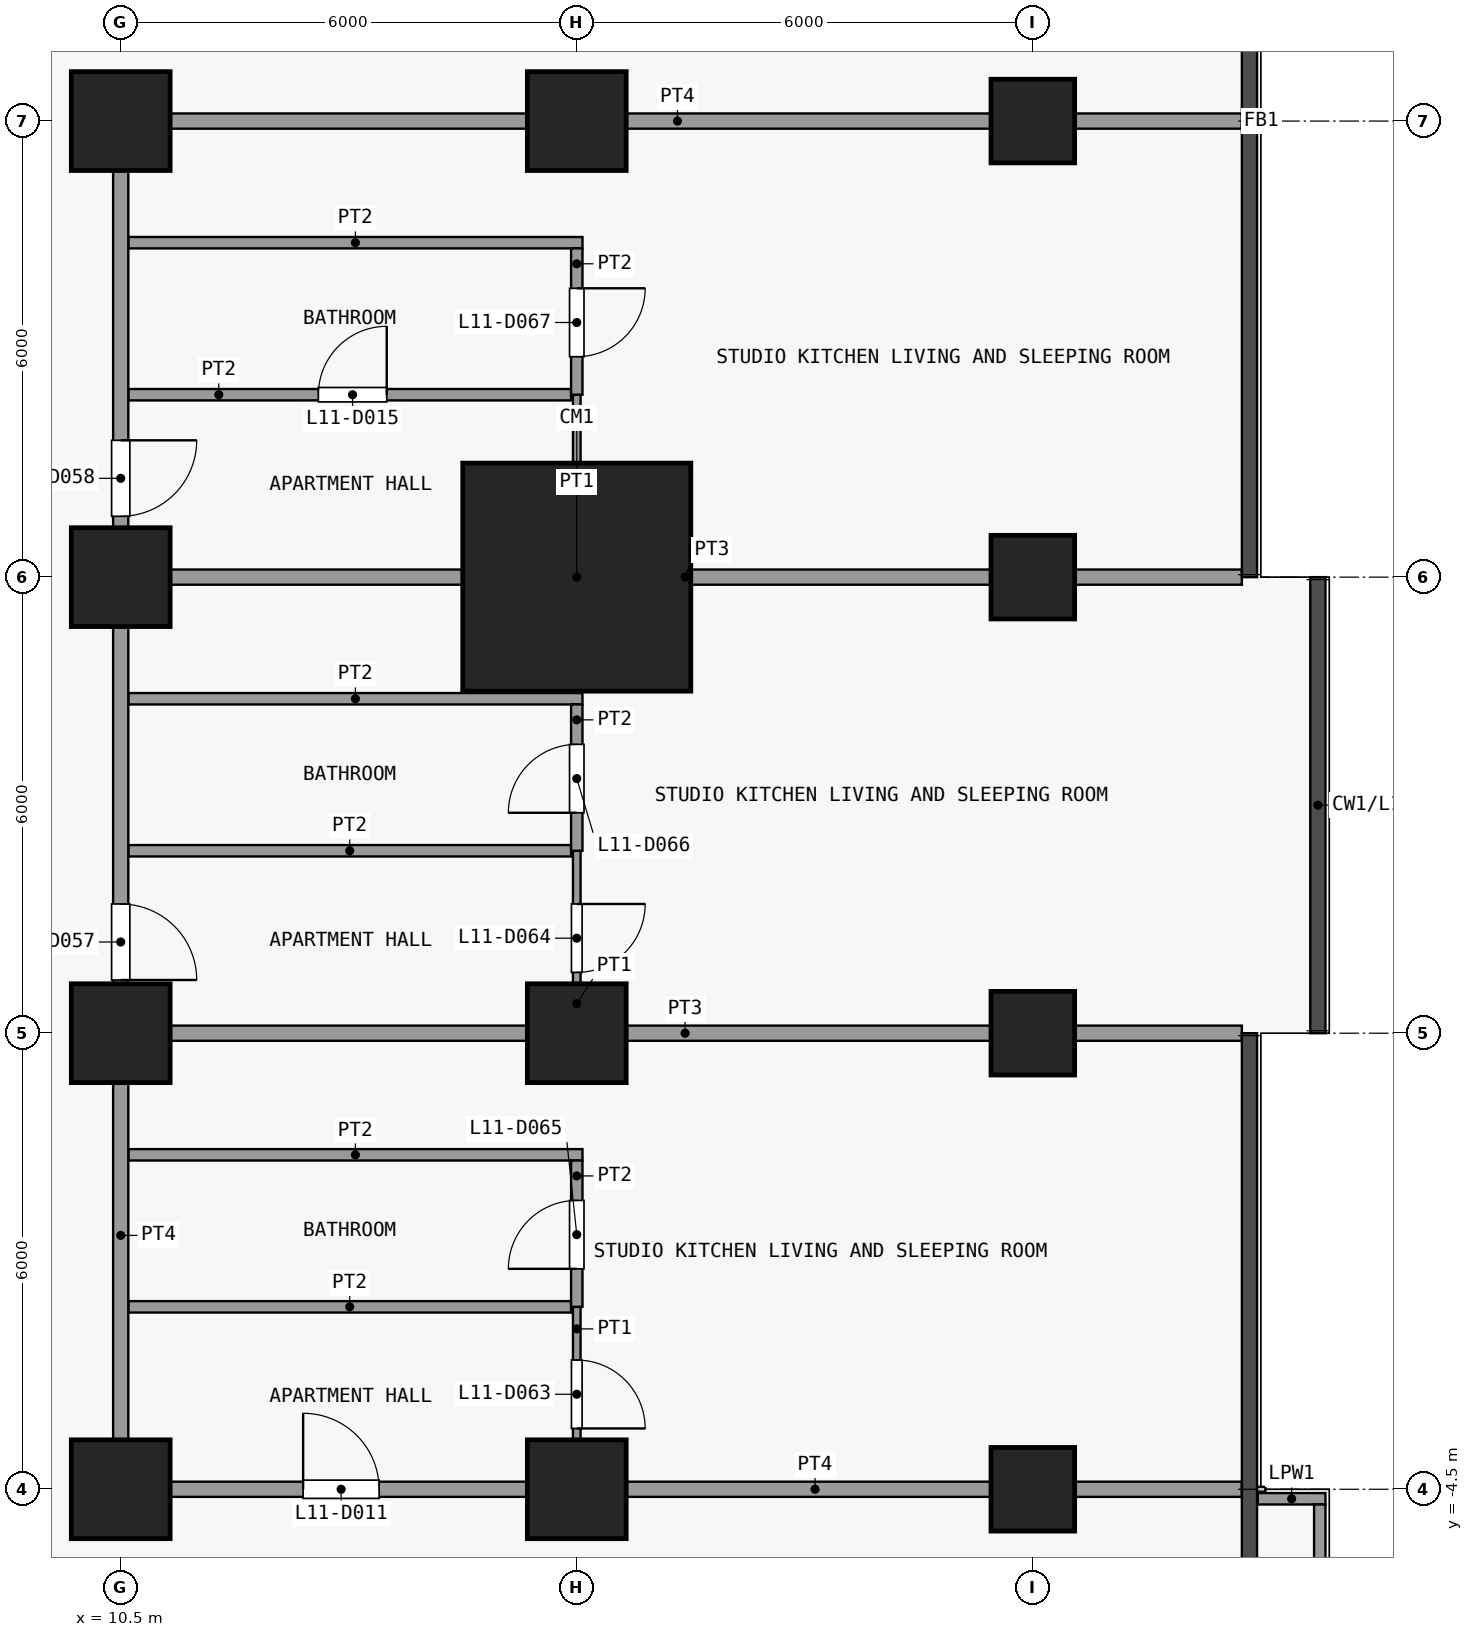
"""IFC4 building model, lengths in metres.
Left out: names, types, materials, properties, quantities, classifications, styles, units other than length and angle.
Written with IfcOpenShell. Run it as: python <this file> out.ifc"""

import sys

from ifc_helpers import new_model, si_unit, direction, frame, frame_2d, origin, origin_2d, place, context, subcontext, project, spatial, rectangle, extrude, element, fill, save


model = new_model("IFC4")
c1 = context("Model", 3, precision=1e-05, world=origin(), true_north=direction((0.0, 1.0)))
c2 = subcontext(c1, "Body", "Model", "MODEL_VIEW")
j1 = project(units=[si_unit("LENGTHUNIT", "METRE"), si_unit("PLANEANGLEUNIT", "RADIAN")], contexts=[c1])
p1 = place(None, origin())
s1 = spatial("IfcSite", under=j1, at=p1, CompositionType="ELEMENT")
p2 = place(p1, origin())
s2 = spatial("IfcBuilding", under=s1, at=p2, CompositionType="ELEMENT")
p3 = place(p2, frame((0.0, 0.0, 50.5)))
s3 = spatial("IfcBuildingStorey", under=s2, at=p3, CompositionType="ELEMENT", Elevation=50.5)
for number, where, z_axis, x_axis in (
    (1, (10.5, -4.5, 0.0), (0.0, 0.0, 1.0), (1.0, 0.0, 0.0)),
    (2, (10.5, 1.5, 0.0), (0.0, 0.0, 1.0), (1.0, 0.0, 0.0)),
    (3, (10.5, 7.5, 0.0), (0.0, 0.0, 1.0), (1.0, 0.0, 0.0)),
    (4, (10.5, 13.5, 0.0), (0.0, 0.0, 1.0), (1.0, 0.0, 0.0)),
    (5, (16.5, -4.5, 0.0), (0.0, 0.0, 1.0), (1.0, 0.0, 0.0)),
    (6, (16.5, 1.5, 0.0), (0.0, 0.0, 1.0), (1.0, 0.0, 0.0)),
):
    element("IfcColumn", number, at=place(p3, frame(where, z_axis=z_axis, x_axis=x_axis)), inside=s3, PredefinedType="COLUMN", context=c2, shape_type="SweptSolid", body=[
        extrude(rectangle(XDim=1.3, YDim=1.3, at=origin_2d()), origin(), (0.0, 0.0, 1.0), 3.6),
    ])
p4 = place(p3, frame((16.5, 7.5, 0.0), z_axis=(0.0, 0.0, 1.0), x_axis=(1.0, 0.0, 0.0)))
e7 = element("IfcColumn", 7, at=p4, inside=s3, PredefinedType="COLUMN", context=c2, shape_type="SweptSolid", body=[
    extrude(rectangle(XDim=3.0, YDim=3.0, at=origin_2d()), origin(), (0.0, 0.0, 1.0), 3.6),
])
p5 = place(p3, frame((16.5, 13.5, 0.0), z_axis=(0.0, 0.0, 1.0), x_axis=(1.0, 0.0, 0.0)))
e8 = element("IfcColumn", 8, at=p5, inside=s3, PredefinedType="COLUMN", context=c2, shape_type="SweptSolid", body=[
    extrude(rectangle(XDim=1.3, YDim=1.3, at=origin_2d()), origin(), (0.0, 0.0, 1.0), 3.6),
])
for number, where, z_axis, x_axis in (
    (9, (22.5, -4.5, 0.0), (0.0, 0.0, 1.0), (1.0, 0.0, 0.0)),
    (10, (22.5, 1.5, 0.0), (0.0, 0.0, 1.0), (1.0, 0.0, 0.0)),
    (11, (22.5, 7.5, 0.0), (0.0, 0.0, 1.0), (1.0, 0.0, 0.0)),
    (12, (22.5, 13.5, 0.0), (0.0, 0.0, 1.0), (1.0, 0.0, 0.0)),
):
    element("IfcColumn", number, at=place(p3, frame(where, z_axis=z_axis, x_axis=x_axis)), inside=s3, PredefinedType="COLUMN", context=c2, shape_type="SweptSolid", body=[
        extrude(rectangle(XDim=1.1, YDim=1.1, at=origin_2d()), origin(), (0.0, 0.0, 1.0), 3.6),
    ])
p6 = place(p3, frame((25.46, -4.625, 0.0), z_axis=(0.0, 0.0, 1.0), x_axis=(1.0, 0.0, 0.0)))
e13 = element("IfcWall", 13, at=p6, inside=s3, PredefinedType="PARAPET", context=c2, shape_type="SweptSolid", body=[
    extrude(rectangle(XDim=0.89, YDim=0.15, at=frame_2d((0.445, 0.0))), origin(), (0.0, 0.0, 1.0), 1.15),
])
p7 = place(p3, frame((26.275, -4.7, 0.0), z_axis=(0.0, 0.0, 1.0), x_axis=(0.0, -1.0, 0.0)))
e14 = element("IfcWall", 14, at=p7, inside=s3, PredefinedType="PARAPET", context=c2, shape_type="SweptSolid", body=[
    extrude(rectangle(XDim=8.75, YDim=0.15, at=frame_2d((4.375, 0.0))), origin(), (0.0, 0.0, 1.0), 1.15),
])
p8 = place(p3, frame((10.4, -4.5, 0.0), z_axis=(0.0, 0.0, 1.0), x_axis=(1.0, 0.0, 0.0)))
e15 = element("IfcWall", 15, at=p8, inside=s3, PredefinedType="PARTITIONING", context=c2, shape_type="SweptSolid", body=[
    extrude(rectangle(XDim=14.85, YDim=0.2, at=frame_2d((7.425, 0.0))), origin(), (0.0, 0.0, 1.0), 3.3),
])
p9 = place(p8, frame((2.5, 0.0, 0.0)))
e16 = element("IfcOpeningElement", 16, at=p9, cuts=e15, PredefinedType="OPENING", context=c2, shape_type="SweptSolid", body=[
    extrude(rectangle(XDim=1.0, YDim=2.1, at=frame_2d((0.5, 1.05))), frame((0.0, 0.11, 0.0), z_axis=(0.0, -1.0, 0.0), x_axis=(1.0, 0.0, 0.0)), (0.0, 0.0, 1.0), 0.22),
])
p10 = place(p3, frame((10.6, -2.1, 0.0), z_axis=(0.0, 0.0, 1.0), x_axis=(1.0, 0.0, 0.0)))
e17 = element("IfcWall", 17, at=p10, inside=s3, PredefinedType="PARTITIONING", context=c2, shape_type="SweptSolid", body=[
    extrude(rectangle(XDim=5.825, YDim=0.15, at=frame_2d((2.913, 0.0))), origin(), (0.0, 0.0, 1.0), 3.3),
])
p11 = place(p3, frame((10.6, -0.1, 0.0), z_axis=(0.0, 0.0, 1.0), x_axis=(1.0, 0.0, 0.0)))
e18 = element("IfcWall", 18, at=p11, inside=s3, PredefinedType="PARTITIONING", context=c2, shape_type="SweptSolid", body=[
    extrude(rectangle(XDim=5.975, YDim=0.15, at=frame_2d((2.987, 0.0))), origin(), (0.0, 0.0, 1.0), 3.3),
])
p12 = place(p3, frame((10.6, 1.5, 0.0), z_axis=(0.0, 0.0, 1.0), x_axis=(1.0, 0.0, 0.0)))
e19 = element("IfcWall", 19, at=p12, inside=s3, PredefinedType="PARTITIONING", context=c2, shape_type="SweptSolid", body=[
    extrude(rectangle(XDim=14.65, YDim=0.2, at=frame_2d((7.325, 0.0))), origin(), (0.0, 0.0, 1.0), 3.3),
])
p13 = place(p3, frame((10.6, 3.9, 0.0), z_axis=(0.0, 0.0, 1.0), x_axis=(1.0, 0.0, 0.0)))
e20 = element("IfcWall", 20, at=p13, inside=s3, PredefinedType="PARTITIONING", context=c2, shape_type="SweptSolid", body=[
    extrude(rectangle(XDim=5.825, YDim=0.15, at=frame_2d((2.913, 0.0))), origin(), (0.0, 0.0, 1.0), 3.3),
])
p14 = place(p3, frame((10.6, 5.9, 0.0), z_axis=(0.0, 0.0, 1.0), x_axis=(1.0, 0.0, 0.0)))
e21 = element("IfcWall", 21, at=p14, inside=s3, PredefinedType="PARTITIONING", context=c2, shape_type="SweptSolid", body=[
    extrude(rectangle(XDim=5.975, YDim=0.15, at=frame_2d((2.987, 0.0))), origin(), (0.0, 0.0, 1.0), 3.3),
])
p15 = place(p3, frame((10.6, 7.5, 0.0), z_axis=(0.0, 0.0, 1.0), x_axis=(1.0, 0.0, 0.0)))
e22 = element("IfcWall", 22, at=p15, inside=s3, PredefinedType="PARTITIONING", context=c2, shape_type="SweptSolid", body=[
    extrude(rectangle(XDim=14.65, YDim=0.2, at=frame_2d((7.325, 0.0))), origin(), (0.0, 0.0, 1.0), 3.3),
])
p16 = place(p3, frame((10.6, 9.9, 0.0), z_axis=(0.0, 0.0, 1.0), x_axis=(1.0, 0.0, 0.0)))
e23 = element("IfcWall", 23, at=p16, inside=s3, PredefinedType="PARTITIONING", context=c2, shape_type="SweptSolid", body=[
    extrude(rectangle(XDim=5.825, YDim=0.15, at=frame_2d((2.913, 0.0))), origin(), (0.0, 0.0, 1.0), 3.3),
])
p17 = place(p16, frame((2.5, 0.0, 0.0)))
e24 = element("IfcOpeningElement", 24, at=p17, cuts=e23, PredefinedType="OPENING", context=c2, shape_type="SweptSolid", body=[
    extrude(rectangle(XDim=0.9, YDim=2.1, at=frame_2d((0.45, 1.05))), frame((0.0, 0.085, 0.0), z_axis=(0.0, -1.0, 0.0), x_axis=(1.0, 0.0, 0.0)), (0.0, 0.0, 1.0), 0.17),
])
p18 = place(p3, frame((10.6, 11.9, 0.0), z_axis=(0.0, 0.0, 1.0), x_axis=(1.0, 0.0, 0.0)))
e25 = element("IfcWall", 25, at=p18, inside=s3, PredefinedType="PARTITIONING", context=c2, shape_type="SweptSolid", body=[
    extrude(rectangle(XDim=5.975, YDim=0.15, at=frame_2d((2.987, 0.0))), origin(), (0.0, 0.0, 1.0), 3.3),
])
p19 = place(p3, frame((10.4, 13.5, 0.0), z_axis=(0.0, 0.0, 1.0), x_axis=(1.0, 0.0, 0.0)))
e26 = element("IfcWall", 26, at=p19, inside=s3, PredefinedType="PARTITIONING", context=c2, shape_type="SweptSolid", body=[
    extrude(rectangle(XDim=14.85, YDim=0.2, at=frame_2d((7.425, 0.0))), origin(), (0.0, 0.0, 1.0), 3.3),
])
p20 = place(p3, frame((10.5, -4.4, 0.0), z_axis=(0.0, 0.0, 1.0), x_axis=(0.0, 1.0, 0.0)))
e27 = element("IfcWall", 27, at=p20, inside=s3, PredefinedType="PARTITIONING", context=c2, shape_type="SweptSolid", body=[
    extrude(rectangle(XDim=17.8, YDim=0.2, at=frame_2d((8.9, 0.0))), origin(), (0.0, 0.0, 1.0), 3.3),
])
p21 = place(p20, frame((6.6, 0.0, 0.0)))
e28 = element("IfcOpeningElement", 28, at=p21, cuts=e27, PredefinedType="OPENING", context=c2, shape_type="SweptSolid", body=[
    extrude(rectangle(XDim=1.0, YDim=2.1, at=frame_2d((0.5, 1.05))), frame((0.0, 0.11, 0.0), z_axis=(0.0, -1.0, 0.0), x_axis=(1.0, 0.0, 0.0)), (0.0, 0.0, 1.0), 0.22),
])
p22 = place(p20, frame((12.7, 0.0, 0.0)))
e29 = element("IfcOpeningElement", 29, at=p22, cuts=e27, PredefinedType="OPENING", context=c2, shape_type="SweptSolid", body=[
    extrude(rectangle(XDim=1.0, YDim=2.1, at=frame_2d((0.5, 1.05))), frame((0.0, 0.11, 0.0), z_axis=(0.0, -1.0, 0.0), x_axis=(1.0, 0.0, 0.0)), (0.0, 0.0, 1.0), 0.22),
])
p23 = place(p3, frame((16.5, -4.4, 0.0), z_axis=(0.0, 0.0, 1.0), x_axis=(0.0, 1.0, 0.0)))
e30 = element("IfcWall", 30, at=p23, inside=s3, PredefinedType="PARTITIONING", context=c2, shape_type="SweptSolid", body=[
    extrude(rectangle(XDim=2.3, YDim=0.1, at=frame_2d((1.15, 0.0))), origin(), (0.0, 0.0, 1.0), 3.3),
])
p24 = place(p23, frame((0.7, 0.0, 0.0)))
e31 = element("IfcOpeningElement", 31, at=p24, cuts=e30, PredefinedType="OPENING", context=c2, shape_type="SweptSolid", body=[
    extrude(rectangle(XDim=0.9, YDim=2.1, at=frame_2d((0.45, 1.05))), frame((0.0, 0.06, 0.0), z_axis=(0.0, -1.0, 0.0), x_axis=(1.0, 0.0, 0.0)), (0.0, 0.0, 1.0), 0.12),
])
p25 = place(p3, frame((16.5, 1.6, 0.0), z_axis=(0.0, 0.0, 1.0), x_axis=(0.0, 1.0, 0.0)))
e32 = element("IfcWall", 32, at=p25, inside=s3, PredefinedType="PARTITIONING", context=c2, shape_type="SweptSolid", body=[
    extrude(rectangle(XDim=2.3, YDim=0.1, at=frame_2d((1.15, 0.0))), origin(), (0.0, 0.0, 1.0), 3.3),
])
p26 = place(p25, frame((0.7, 0.0, 0.0)))
e33 = element("IfcOpeningElement", 33, at=p26, cuts=e32, PredefinedType="OPENING", context=c2, shape_type="SweptSolid", body=[
    extrude(rectangle(XDim=0.9, YDim=2.1, at=frame_2d((0.45, 1.05))), frame((0.0, 0.06, 0.0), z_axis=(0.0, -1.0, 0.0), x_axis=(1.0, 0.0, 0.0)), (0.0, 0.0, 1.0), 0.12),
])
p27 = place(p3, frame((16.5, 7.6, 0.0), z_axis=(0.0, 0.0, 1.0), x_axis=(0.0, 1.0, 0.0)))
e34 = element("IfcWall", 34, at=p27, inside=s3, PredefinedType="PARTITIONING", context=c2, shape_type="SweptSolid", body=[
    extrude(rectangle(XDim=2.3, YDim=0.1, at=frame_2d((1.15, 0.0))), origin(), (0.0, 0.0, 1.0), 3.3),
])
p28 = place(p3, frame((16.5, -2.1, 0.0), z_axis=(0.0, 0.0, 1.0), x_axis=(0.0, 1.0, 0.0)))
e35 = element("IfcWall", 35, at=p28, inside=s3, PredefinedType="PARTITIONING", context=c2, shape_type="SweptSolid", body=[
    extrude(rectangle(XDim=1.925, YDim=0.15, at=frame_2d((0.962, 0.0))), origin(), (0.0, 0.0, 1.0), 3.3),
])
p29 = place(p28, frame((0.5, 0.0, 0.0)))
e36 = element("IfcOpeningElement", 36, at=p29, cuts=e35, PredefinedType="OPENING", context=c2, shape_type="SweptSolid", body=[
    extrude(rectangle(XDim=0.9, YDim=2.1, at=frame_2d((0.45, 1.05))), frame((0.0, 0.085, 0.0), z_axis=(0.0, -1.0, 0.0), x_axis=(1.0, 0.0, 0.0)), (0.0, 0.0, 1.0), 0.17),
])
p30 = place(p3, frame((16.5, 3.9, 0.0), z_axis=(0.0, 0.0, 1.0), x_axis=(0.0, 1.0, 0.0)))
e37 = element("IfcWall", 37, at=p30, inside=s3, PredefinedType="PARTITIONING", context=c2, shape_type="SweptSolid", body=[
    extrude(rectangle(XDim=1.925, YDim=0.15, at=frame_2d((0.962, 0.0))), origin(), (0.0, 0.0, 1.0), 3.3),
])
p31 = place(p30, frame((0.5, 0.0, 0.0)))
e38 = element("IfcOpeningElement", 38, at=p31, cuts=e37, PredefinedType="OPENING", context=c2, shape_type="SweptSolid", body=[
    extrude(rectangle(XDim=0.9, YDim=2.1, at=frame_2d((0.45, 1.05))), frame((0.0, 0.085, 0.0), z_axis=(0.0, -1.0, 0.0), x_axis=(1.0, 0.0, 0.0)), (0.0, 0.0, 1.0), 0.17),
])
p32 = place(p3, frame((16.5, 9.9, 0.0), z_axis=(0.0, 0.0, 1.0), x_axis=(0.0, 1.0, 0.0)))
e39 = element("IfcWall", 39, at=p32, inside=s3, PredefinedType="PARTITIONING", context=c2, shape_type="SweptSolid", body=[
    extrude(rectangle(XDim=1.925, YDim=0.15, at=frame_2d((0.962, 0.0))), origin(), (0.0, 0.0, 1.0), 3.3),
])
p33 = place(p32, frame((0.5, 0.0, 0.0)))
e40 = element("IfcOpeningElement", 40, at=p33, cuts=e39, PredefinedType="OPENING", context=c2, shape_type="SweptSolid", body=[
    extrude(rectangle(XDim=0.9, YDim=2.1, at=frame_2d((0.45, 1.05))), frame((0.0, 0.085, 0.0), z_axis=(0.0, -1.0, 0.0), x_axis=(1.0, 0.0, 0.0)), (0.0, 0.0, 1.0), 0.17),
])
p34 = place(p9, origin())
e41 = element("IfcDoor", 41, at=p34, inside=s3, OperationType="SINGLE_SWING_RIGHT", PredefinedType="DOOR", context=c2, shape_type="SweptSolid", body=[
    extrude(rectangle(XDim=1.0, YDim=2.1, at=frame_2d((0.5, 1.05))), frame((0.0, 0.025, 0.0), z_axis=(0.0, -1.0, 0.0), x_axis=(1.0, 0.0, 0.0)), (0.0, 0.0, 1.0), 0.05),
])
fill(e16, e41)
p35 = place(p17, origin())
e42 = element("IfcDoor", 42, at=p35, inside=s3, OperationType="SINGLE_SWING_LEFT", PredefinedType="DOOR", context=c2, shape_type="SweptSolid", body=[
    extrude(rectangle(XDim=0.9, YDim=2.1, at=frame_2d((0.45, 1.05))), frame((0.0, 0.025, 0.0), z_axis=(0.0, -1.0, 0.0), x_axis=(1.0, 0.0, 0.0)), (0.0, 0.0, 1.0), 0.05),
])
fill(e24, e42)
p36 = place(p21, origin())
e43 = element("IfcDoor", 43, at=p36, inside=s3, OperationType="SINGLE_SWING_LEFT", PredefinedType="DOOR", context=c2, shape_type="SweptSolid", body=[
    extrude(rectangle(XDim=1.0, YDim=2.1, at=frame_2d((0.5, 1.05))), frame((0.0, 0.025, 0.0), z_axis=(0.0, -1.0, 0.0), x_axis=(1.0, 0.0, 0.0)), (0.0, 0.0, 1.0), 0.05),
])
fill(e28, e43)
p37 = place(p22, origin())
e44 = element("IfcDoor", 44, at=p37, inside=s3, OperationType="SINGLE_SWING_RIGHT", PredefinedType="DOOR", context=c2, shape_type="SweptSolid", body=[
    extrude(rectangle(XDim=1.0, YDim=2.1, at=frame_2d((0.5, 1.05))), frame((0.0, 0.025, 0.0), z_axis=(0.0, -1.0, 0.0), x_axis=(1.0, 0.0, 0.0)), (0.0, 0.0, 1.0), 0.05),
])
fill(e29, e44)
p38 = place(p24, origin())
e45 = element("IfcDoor", 45, at=p38, inside=s3, OperationType="SINGLE_SWING_LEFT", PredefinedType="DOOR", context=c2, shape_type="SweptSolid", body=[
    extrude(rectangle(XDim=0.9, YDim=2.1, at=frame_2d((0.45, 1.05))), frame((0.0, 0.025, 0.0), z_axis=(0.0, -1.0, 0.0), x_axis=(1.0, 0.0, 0.0)), (0.0, 0.0, 1.0), 0.05),
])
fill(e31, e45)
p39 = place(p26, origin())
e46 = element("IfcDoor", 46, at=p39, inside=s3, OperationType="SINGLE_SWING_RIGHT", PredefinedType="DOOR", context=c2, shape_type="SweptSolid", body=[
    extrude(rectangle(XDim=0.9, YDim=2.1, at=frame_2d((0.45, 1.05))), frame((0.0, 0.025, 0.0), z_axis=(0.0, -1.0, 0.0), x_axis=(1.0, 0.0, 0.0)), (0.0, 0.0, 1.0), 0.05),
])
fill(e33, e46)
p40 = place(p29, origin())
e47 = element("IfcDoor", 47, at=p40, inside=s3, OperationType="SINGLE_SWING_RIGHT", PredefinedType="DOOR", context=c2, shape_type="SweptSolid", body=[
    extrude(rectangle(XDim=0.9, YDim=2.1, at=frame_2d((0.45, 1.05))), frame((0.0, 0.025, 0.0), z_axis=(0.0, -1.0, 0.0), x_axis=(1.0, 0.0, 0.0)), (0.0, 0.0, 1.0), 0.05),
])
fill(e36, e47)
p41 = place(p31, origin())
e48 = element("IfcDoor", 48, at=p41, inside=s3, OperationType="SINGLE_SWING_RIGHT", PredefinedType="DOOR", context=c2, shape_type="SweptSolid", body=[
    extrude(rectangle(XDim=0.9, YDim=2.1, at=frame_2d((0.45, 1.05))), frame((0.0, 0.025, 0.0), z_axis=(0.0, -1.0, 0.0), x_axis=(1.0, 0.0, 0.0)), (0.0, 0.0, 1.0), 0.05),
])
fill(e38, e48)
p42 = place(p33, origin())
e49 = element("IfcDoor", 49, at=p42, inside=s3, OperationType="SINGLE_SWING_RIGHT", PredefinedType="DOOR", context=c2, shape_type="SweptSolid", body=[
    extrude(rectangle(XDim=0.9, YDim=2.1, at=frame_2d((0.45, 1.05))), frame((0.0, 0.025, 0.0), z_axis=(0.0, -1.0, 0.0), x_axis=(1.0, 0.0, 0.0)), (0.0, 0.0, 1.0), 0.05),
])
fill(e40, e49)
save(model, sys.argv[1])
